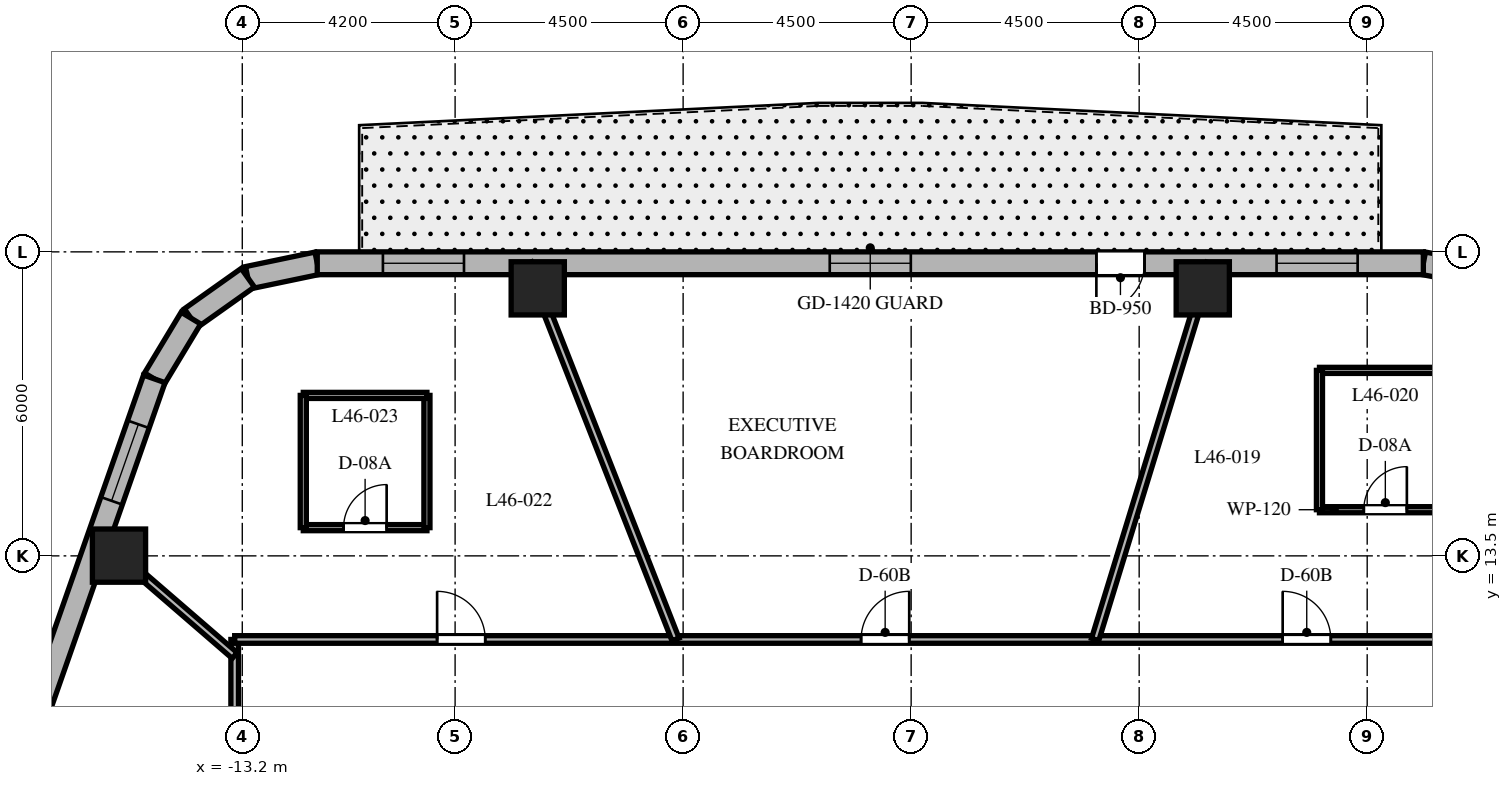
"""IFC4 building model, lengths in metres.
Left out: names, types, materials, properties, quantities, classifications, styles, units other than length and angle.
Written with IfcOpenShell. Run it as: python <this file> out.ifc"""

import sys

from ifc_helpers import new_model, si_unit, direction, frame, frame_2d, origin, origin_2d, place, context, subcontext, project, spatial, rectangle, extrude, element, fill, save


model = new_model("IFC4")
c1 = context("Model", 3, precision=1e-05, world=origin(), true_north=direction((0.0, 1.0)))
c2 = subcontext(c1, "Body", "Model", "MODEL_VIEW")
j1 = project(units=[si_unit("LENGTHUNIT", "METRE"), si_unit("PLANEANGLEUNIT", "RADIAN")], contexts=[c1])
p1 = place(None, origin())
s1 = spatial("IfcSite", under=j1, at=p1, CompositionType="ELEMENT")
p2 = place(p1, origin())
s2 = spatial("IfcBuilding", under=s1, at=p2, CompositionType="ELEMENT")
p3 = place(p2, frame((0.0, 0.0, 186.7)))
s3 = spatial("IfcBuildingStorey", under=s2, at=p3, CompositionType="ELEMENT", Elevation=186.7)
for number, where, z_axis, x_axis in (
    (1, (5.755, 18.78, 0.0), (0.0, 0.0, 1.0), (1.0, 0.0, 0.0)),
    (2, (-7.369, 18.78, 0.0), (0.0, 0.0, 1.0), (1.0, 0.0, 0.0)),
    (3, (-15.633, 13.505, 0.0), (0.0, 0.0, 1.0), (1.0, 0.0, 0.0)),
):
    element("IfcColumn", number, at=place(p3, frame(where, z_axis=z_axis, x_axis=x_axis)), inside=s3, PredefinedType="COLUMN", context=c2, shape_type="SweptSolid", body=[
        extrude(rectangle(XDim=1.05, YDim=1.05, at=origin_2d()), origin(), (0.0, 0.0, 1.0), 3.7),
    ])
p4 = place(p3, frame((11.349, 19.043, 0.0), z_axis=(0.0, 0.0, 1.0), x_axis=(-0.982931267051, 0.183973161772, 0.0)))
e4 = element("IfcWall", 4, at=p4, inside=s3, PredefinedType="SOLIDWALL", context=c2, shape_type="SweptSolid", body=[
    extrude(rectangle(XDim=1.262, YDim=0.45, at=frame_2d((0.631, 0.0))), origin(), (0.0, 0.0, 1.0), 3.4),
])
p5 = place(p3, frame((-11.72, 19.275, 0.0), z_axis=(0.0, 0.0, 1.0), x_axis=(-0.97893106758, -0.204191001093, 0.0)))
e5 = element("IfcWall", 5, at=p5, inside=s3, PredefinedType="SOLIDWALL", context=c2, shape_type="SweptSolid", body=[
    extrude(rectangle(XDim=1.4, YDim=0.45, at=frame_2d((0.7, 0.0))), origin(), (0.0, 0.0, 1.0), 3.4),
])
p6 = place(p3, frame((-13.091, 18.989, 0.0), z_axis=(0.0, 0.0, 1.0), x_axis=(-0.815574637848, -0.578651890258, 0.0)))
e6 = element("IfcWall", 6, at=p6, inside=s3, PredefinedType="SOLIDWALL", context=c2, shape_type="SweptSolid", body=[
    extrude(rectangle(XDim=1.377, YDim=0.45, at=frame_2d((0.688, 0.0))), origin(), (0.0, 0.0, 1.0), 3.4),
])
p7 = place(p3, frame((-14.214, 18.192, 0.0), z_axis=(0.0, 0.0, 1.0), x_axis=(-0.516340945502, -0.856383108193, 0.0)))
e7 = element("IfcWall", 7, at=p7, inside=s3, PredefinedType="SOLIDWALL", context=c2, shape_type="SweptSolid", body=[
    extrude(rectangle(XDim=1.4, YDim=0.45, at=frame_2d((0.7, 0.0))), origin(), (0.0, 0.0, 1.0), 3.4),
])
p8 = place(p3, frame((10.108, 19.275, 0.0), z_axis=(0.0, 0.0, 1.0), x_axis=(-1.0, 0.0, 0.0)))
e8 = element("IfcWall", 8, at=p8, inside=s3, PredefinedType="SOLIDWALL", context=c2, shape_type="SweptSolid", body=[
    extrude(rectangle(XDim=21.829, YDim=0.45, at=frame_2d((10.915, 0.0))), origin(), (0.0, 0.0, 1.0), 3.4),
])
p9 = place(p8, frame((5.503, 0.0, 0.0)))
e9 = element("IfcOpeningElement", 9, at=p9, cuts=e8, PredefinedType="OPENING", context=c2, shape_type="SweptSolid", body=[
    extrude(rectangle(XDim=0.95, YDim=2.15, at=frame_2d((0.475, 1.075))), frame((0.0, 0.235, 0.0), z_axis=(0.0, -1.0, 0.0), x_axis=(1.0, 0.0, 0.0)), (0.0, 0.0, 1.0), 0.47),
])
p10 = place(p8, frame((1.297, 0.0, 0.8)))
e10 = element("IfcOpeningElement", 10, at=p10, cuts=e8, PredefinedType="OPENING", context=c2, shape_type="SweptSolid", body=[
    extrude(rectangle(XDim=1.6, YDim=1.75, at=frame_2d((0.8, 0.875))), frame((0.0, 0.235, 0.0), z_axis=(0.0, -1.0, 0.0), x_axis=(1.0, 0.0, 0.0)), (0.0, 0.0, 1.0), 0.47),
])
p11 = place(p8, frame((10.115, 0.0, 0.8)))
e11 = element("IfcOpeningElement", 11, at=p11, cuts=e8, PredefinedType="OPENING", context=c2, shape_type="SweptSolid", body=[
    extrude(rectangle(XDim=1.6, YDim=1.75, at=frame_2d((0.8, 0.875))), frame((0.0, 0.235, 0.0), z_axis=(0.0, -1.0, 0.0), x_axis=(1.0, 0.0, 0.0)), (0.0, 0.0, 1.0), 0.47),
])
p12 = place(p8, frame((18.933, 0.0, 0.8)))
e12 = element("IfcOpeningElement", 12, at=p12, cuts=e8, PredefinedType="OPENING", context=c2, shape_type="SweptSolid", body=[
    extrude(rectangle(XDim=1.6, YDim=1.75, at=frame_2d((0.8, 0.875))), frame((0.0, 0.235, 0.0), z_axis=(0.0, -1.0, 0.0), x_axis=(1.0, 0.0, 0.0)), (0.0, 0.0, 1.0), 0.47),
])
p13 = place(p3, frame((-14.937, 16.993, 0.0), z_axis=(0.0, 0.0, 1.0), x_axis=(-0.330431575061, -0.943829949834, 0.0)))
e13 = element("IfcWall", 13, at=p13, inside=s3, PredefinedType="SOLIDWALL", context=c2, shape_type="SweptSolid", body=[
    extrude(rectangle(XDim=17.689, YDim=0.45, at=frame_2d((8.844, 0.0))), origin(), (0.0, 0.0, 1.0), 3.4),
])
p14 = place(p13, frame((0.95, 0.0, 0.8)))
e14 = element("IfcOpeningElement", 14, at=p14, cuts=e13, PredefinedType="OPENING", context=c2, shape_type="SweptSolid", body=[
    extrude(rectangle(XDim=1.6, YDim=1.75, at=frame_2d((0.8, 0.875))), frame((0.0, 0.235, 0.0), z_axis=(0.0, -1.0, 0.0), x_axis=(1.0, 0.0, 0.0)), (0.0, 0.0, 1.0), 0.47),
])
p15 = place(p13, frame((7.99, 0.0, 0.8)))
e15 = element("IfcOpeningElement", 15, at=p15, cuts=e13, PredefinedType="OPENING", context=c2, shape_type="SweptSolid", body=[
    extrude(rectangle(XDim=1.6, YDim=1.75, at=frame_2d((0.8, 0.875))), frame((0.0, 0.235, 0.0), z_axis=(0.0, -1.0, 0.0), x_axis=(1.0, 0.0, 0.0)), (0.0, 0.0, 1.0), 0.47),
])
p16 = place(p13, frame((15.084, 0.0, 0.8)))
e16 = element("IfcOpeningElement", 16, at=p16, cuts=e13, PredefinedType="OPENING", context=c2, shape_type="SweptSolid", body=[
    extrude(rectangle(XDim=1.6, YDim=1.75, at=frame_2d((0.8, 0.875))), frame((0.0, 0.235, 0.0), z_axis=(0.0, -1.0, 0.0), x_axis=(1.0, 0.0, 0.0)), (0.0, 0.0, 1.0), 0.47),
])
p17 = place(p3, frame((-13.35, -11.85, 0.0), z_axis=(0.0, 0.0, 1.0), x_axis=(0.0, 1.0, 0.0)))
e17 = element("IfcWall", 17, at=p17, inside=s3, PredefinedType="PARTITIONING", context=c2, shape_type="SweptSolid", body=[
    extrude(rectangle(XDim=23.7, YDim=0.15, at=frame_2d((11.85, 0.0))), origin(), (0.0, 0.0, 1.0), 2.84),
])
p18 = place(p17, frame((18.389, 0.0, 0.0)))
e18 = element("IfcOpeningElement", 18, at=p18, cuts=e17, PredefinedType="OPENING", context=c2, shape_type="SweptSolid", body=[
    extrude(rectangle(XDim=0.95, YDim=2.03, at=frame_2d((0.475, 1.015))), frame((0.0, 0.085, 0.0), z_axis=(0.0, -1.0, 0.0), x_axis=(1.0, 0.0, 0.0)), (0.0, 0.0, 1.0), 0.17),
])
p19 = place(p17, frame((10.751, 0.0, 0.0)))
e19 = element("IfcOpeningElement", 19, at=p19, cuts=e17, PredefinedType="OPENING", context=c2, shape_type="SweptSolid", body=[
    extrude(rectangle(XDim=0.95, YDim=2.03, at=frame_2d((0.475, 1.015))), frame((0.0, 0.085, 0.0), z_axis=(0.0, -1.0, 0.0), x_axis=(1.0, 0.0, 0.0)), (0.0, 0.0, 1.0), 0.17),
])
p20 = place(p17, frame((3.74, 0.0, 0.0)))
e20 = element("IfcOpeningElement", 20, at=p20, cuts=e17, PredefinedType="OPENING", context=c2, shape_type="SweptSolid", body=[
    extrude(rectangle(XDim=0.95, YDim=2.03, at=frame_2d((0.475, 1.015))), frame((0.0, 0.085, 0.0), z_axis=(0.0, -1.0, 0.0), x_axis=(1.0, 0.0, 0.0)), (0.0, 0.0, 1.0), 0.17),
])
p21 = place(p3, frame((-13.35, 11.85, 0.0), z_axis=(0.0, 0.0, 1.0), x_axis=(1.0, 0.0, 0.0)))
e21 = element("IfcWall", 21, at=p21, inside=s3, PredefinedType="PARTITIONING", context=c2, shape_type="SweptSolid", body=[
    extrude(rectangle(XDim=26.7, YDim=0.15, at=frame_2d((13.35, 0.0))), origin(), (0.0, 0.0, 1.0), 2.84),
])
p22 = place(p21, frame((20.682, 0.0, 0.0)))
e22 = element("IfcOpeningElement", 22, at=p22, cuts=e21, PredefinedType="OPENING", context=c2, shape_type="SweptSolid", body=[
    extrude(rectangle(XDim=0.95, YDim=2.03, at=frame_2d((0.475, 1.015))), frame((0.0, 0.085, 0.0), z_axis=(0.0, -1.0, 0.0), x_axis=(1.0, 0.0, 0.0)), (0.0, 0.0, 1.0), 0.17),
])
p23 = place(p21, frame((12.362, 0.0, 0.0)))
e23 = element("IfcOpeningElement", 23, at=p23, cuts=e21, PredefinedType="OPENING", context=c2, shape_type="SweptSolid", body=[
    extrude(rectangle(XDim=0.95, YDim=2.03, at=frame_2d((0.475, 1.015))), frame((0.0, 0.085, 0.0), z_axis=(0.0, -1.0, 0.0), x_axis=(1.0, 0.0, 0.0)), (0.0, 0.0, 1.0), 0.17),
])
p24 = place(p21, frame((3.995, 0.0, 0.0)))
e24 = element("IfcOpeningElement", 24, at=p24, cuts=e21, PredefinedType="OPENING", context=c2, shape_type="SweptSolid", body=[
    extrude(rectangle(XDim=0.95, YDim=2.03, at=frame_2d((0.475, 1.015))), frame((0.0, 0.085, 0.0), z_axis=(0.0, -1.0, 0.0), x_axis=(1.0, 0.0, 0.0)), (0.0, 0.0, 1.0), 0.17),
])
p25 = place(p3, frame((3.631, 11.85, 0.0), z_axis=(0.0, 0.0, 1.0), x_axis=(0.293007573338, 0.956110120209, 0.0)))
e25 = element("IfcWall", 25, at=p25, inside=s3, PredefinedType="PARTITIONING", context=c2, shape_type="SweptSolid", body=[
    extrude(rectangle(XDim=7.766, YDim=0.15, at=frame_2d((3.883, 0.0))), origin(), (0.0, 0.0, 1.0), 2.64),
])
p26 = place(p3, frame((-4.65, 11.85, 0.0), z_axis=(0.0, 0.0, 1.0), x_axis=(-0.365265947993, 0.930903210456, 0.0)))
e26 = element("IfcWall", 26, at=p26, inside=s3, PredefinedType="PARTITIONING", context=c2, shape_type="SweptSolid", body=[
    extrude(rectangle(XDim=7.976, YDim=0.15, at=frame_2d((3.988, 0.0))), origin(), (0.0, 0.0, 1.0), 2.64),
])
p27 = place(p3, frame((-13.35, 11.533, 0.0), z_axis=(0.0, 0.0, 1.0), x_axis=(-0.756711647314, 0.65374879183, 0.0)))
e27 = element("IfcWall", 27, at=p27, inside=s3, PredefinedType="PARTITIONING", context=c2, shape_type="SweptSolid", body=[
    extrude(rectangle(XDim=3.55, YDim=0.15, at=frame_2d((1.775, 0.0))), origin(), (0.0, 0.0, 1.0), 2.64),
])
p28 = place(p3, frame((8.058, 14.411, 0.0), z_axis=(0.0, 0.0, 1.0), x_axis=(1.0, 0.0, 0.0)))
e28 = element("IfcWall", 28, at=p28, inside=s3, PredefinedType="PARTITIONING", context=c2, shape_type="SweptSolid", body=[
    extrude(rectangle(XDim=2.6, YDim=0.12, at=frame_2d((1.3, 0.0))), origin(), (0.0, 0.0, 1.0), 3.4),
])
p29 = place(p28, frame((0.875, 0.0, 0.0)))
e29 = element("IfcOpeningElement", 29, at=p29, cuts=e28, PredefinedType="OPENING", context=c2, shape_type="SweptSolid", body=[
    extrude(rectangle(XDim=0.85, YDim=2.03, at=frame_2d((0.425, 1.015))), frame((0.0, 0.07, 0.0), z_axis=(0.0, -1.0, 0.0), x_axis=(1.0, 0.0, 0.0)), (0.0, 0.0, 1.0), 0.14),
])
p30 = place(p3, frame((10.658, 17.161, 0.0), z_axis=(0.0, 0.0, 1.0), x_axis=(-1.0, 0.0, 0.0)))
e30 = element("IfcWall", 30, at=p30, inside=s3, PredefinedType="PARTITIONING", context=c2, shape_type="SweptSolid", body=[
    extrude(rectangle(XDim=2.6, YDim=0.12, at=frame_2d((1.3, 0.0))), origin(), (0.0, 0.0, 1.0), 2.64),
])
p31 = place(p3, frame((8.058, 17.161, 0.0), z_axis=(0.0, 0.0, 1.0), x_axis=(0.0, -1.0, 0.0)))
e31 = element("IfcWall", 31, at=p31, inside=s3, PredefinedType="PARTITIONING", context=c2, shape_type="SweptSolid", body=[
    extrude(rectangle(XDim=2.75, YDim=0.12, at=frame_2d((1.375, 0.0))), origin(), (0.0, 0.0, 1.0), 3.4),
])
p32 = place(p3, frame((-11.996, 14.057, 0.0), z_axis=(0.0, 0.0, 1.0), x_axis=(1.0, 0.0, 0.0)))
e32 = element("IfcWall", 32, at=p32, inside=s3, PredefinedType="PARTITIONING", context=c2, shape_type="SweptSolid", body=[
    extrude(rectangle(XDim=2.44, YDim=0.12, at=frame_2d((1.22, 0.0))), origin(), (0.0, 0.0, 1.0), 2.927),
])
p33 = place(p32, frame((0.795, 0.0, 0.0)))
e33 = element("IfcOpeningElement", 33, at=p33, cuts=e32, PredefinedType="OPENING", context=c2, shape_type="SweptSolid", body=[
    extrude(rectangle(XDim=0.85, YDim=2.03, at=frame_2d((0.425, 1.015))), frame((0.0, 0.07, 0.0), z_axis=(0.0, -1.0, 0.0), x_axis=(1.0, 0.0, 0.0)), (0.0, 0.0, 1.0), 0.14),
])
p34 = place(p3, frame((-9.556, 14.057, 0.0), z_axis=(0.0, 0.0, 1.0), x_axis=(0.0, 1.0, 0.0)))
e34 = element("IfcWall", 34, at=p34, inside=s3, PredefinedType="PARTITIONING", context=c2, shape_type="SweptSolid", body=[
    extrude(rectangle(XDim=2.61, YDim=0.12, at=frame_2d((1.305, 0.0))), origin(), (0.0, 0.0, 1.0), 2.927),
])
p35 = place(p3, frame((-9.556, 16.667, 0.0), z_axis=(0.0, 0.0, 1.0), x_axis=(-1.0, 0.0, 0.0)))
e35 = element("IfcWall", 35, at=p35, inside=s3, PredefinedType="PARTITIONING", context=c2, shape_type="SweptSolid", body=[
    extrude(rectangle(XDim=2.44, YDim=0.12, at=frame_2d((1.22, 0.0))), origin(), (0.0, 0.0, 1.0), 2.64),
])
p36 = place(p3, frame((-11.996, 16.667, 0.0), z_axis=(0.0, 0.0, 1.0), x_axis=(0.0, -1.0, 0.0)))
e36 = element("IfcWall", 36, at=p36, inside=s3, PredefinedType="PARTITIONING", context=c2, shape_type="SweptSolid", body=[
    extrude(rectangle(XDim=2.61, YDim=0.12, at=frame_2d((1.305, 0.0))), origin(), (0.0, 0.0, 1.0), 2.64),
])
p37 = place(p9, origin())
e37 = element("IfcDoor", 37, at=p37, inside=s3, OperationType="SINGLE_SWING_RIGHT", PredefinedType="DOOR", context=c2, shape_type="SweptSolid", body=[
    extrude(rectangle(XDim=0.95, YDim=2.15, at=frame_2d((0.475, 1.075))), frame((0.0, 0.025, 0.0), z_axis=(0.0, -1.0, 0.0), x_axis=(1.0, 0.0, 0.0)), (0.0, 0.0, 1.0), 0.05),
])
fill(e9, e37)
p38 = place(p10, origin())
e38 = element("IfcWindow", 38, at=p38, inside=s3, PartitioningType="SINGLE_PANEL", PredefinedType="WINDOW", context=c2, shape_type="SweptSolid", body=[
    extrude(rectangle(XDim=1.6, YDim=1.75, at=frame_2d((0.8, 0.875))), frame((0.0, 0.03, 0.0), z_axis=(0.0, -1.0, 0.0), x_axis=(1.0, 0.0, 0.0)), (0.0, 0.0, 1.0), 0.06),
])
fill(e10, e38)
p39 = place(p11, origin())
e39 = element("IfcWindow", 39, at=p39, inside=s3, PartitioningType="SINGLE_PANEL", PredefinedType="WINDOW", context=c2, shape_type="SweptSolid", body=[
    extrude(rectangle(XDim=1.6, YDim=1.75, at=frame_2d((0.8, 0.875))), frame((0.0, 0.03, 0.0), z_axis=(0.0, -1.0, 0.0), x_axis=(1.0, 0.0, 0.0)), (0.0, 0.0, 1.0), 0.06),
])
fill(e11, e39)
p40 = place(p12, origin())
e40 = element("IfcWindow", 40, at=p40, inside=s3, PartitioningType="SINGLE_PANEL", PredefinedType="WINDOW", context=c2, shape_type="SweptSolid", body=[
    extrude(rectangle(XDim=1.6, YDim=1.75, at=frame_2d((0.8, 0.875))), frame((0.0, 0.03, 0.0), z_axis=(0.0, -1.0, 0.0), x_axis=(1.0, 0.0, 0.0)), (0.0, 0.0, 1.0), 0.06),
])
fill(e12, e40)
p41 = place(p14, origin())
e41 = element("IfcWindow", 41, at=p41, inside=s3, PartitioningType="SINGLE_PANEL", PredefinedType="WINDOW", context=c2, shape_type="SweptSolid", body=[
    extrude(rectangle(XDim=1.6, YDim=1.75, at=frame_2d((0.8, 0.875))), frame((0.0, 0.03, 0.0), z_axis=(0.0, -1.0, 0.0), x_axis=(1.0, 0.0, 0.0)), (0.0, 0.0, 1.0), 0.06),
])
fill(e14, e41)
p42 = place(p22, origin())
e42 = element("IfcDoor", 42, at=p42, inside=s3, OperationType="SINGLE_SWING_LEFT", PredefinedType="DOOR", context=c2, shape_type="SweptSolid", body=[
    extrude(rectangle(XDim=0.95, YDim=2.03, at=frame_2d((0.475, 1.015))), frame((0.0, 0.025, 0.0), z_axis=(0.0, -1.0, 0.0), x_axis=(1.0, 0.0, 0.0)), (0.0, 0.0, 1.0), 0.05),
])
fill(e22, e42)
p43 = place(p29, origin())
e43 = element("IfcDoor", 43, at=p43, inside=s3, OperationType="SINGLE_SWING_RIGHT", PredefinedType="DOOR", context=c2, shape_type="SweptSolid", body=[
    extrude(rectangle(XDim=0.85, YDim=2.03, at=frame_2d((0.425, 1.015))), frame((0.0, 0.025, 0.0), z_axis=(0.0, -1.0, 0.0), x_axis=(1.0, 0.0, 0.0)), (0.0, 0.0, 1.0), 0.05),
])
fill(e29, e43)
p44 = place(p23, origin())
e44 = element("IfcDoor", 44, at=p44, inside=s3, OperationType="SINGLE_SWING_RIGHT", PredefinedType="DOOR", context=c2, shape_type="SweptSolid", body=[
    extrude(rectangle(XDim=0.95, YDim=2.03, at=frame_2d((0.475, 1.015))), frame((0.0, 0.025, 0.0), z_axis=(0.0, -1.0, 0.0), x_axis=(1.0, 0.0, 0.0)), (0.0, 0.0, 1.0), 0.05),
])
fill(e23, e44)
p45 = place(p24, origin())
e45 = element("IfcDoor", 45, at=p45, inside=s3, OperationType="SINGLE_SWING_LEFT", PredefinedType="DOOR", context=c2, shape_type="SweptSolid", body=[
    extrude(rectangle(XDim=0.95, YDim=2.03, at=frame_2d((0.475, 1.015))), frame((0.0, 0.025, 0.0), z_axis=(0.0, -1.0, 0.0), x_axis=(1.0, 0.0, 0.0)), (0.0, 0.0, 1.0), 0.05),
])
fill(e24, e45)
p46 = place(p33, origin())
e46 = element("IfcDoor", 46, at=p46, inside=s3, OperationType="SINGLE_SWING_RIGHT", PredefinedType="DOOR", context=c2, shape_type="SweptSolid", body=[
    extrude(rectangle(XDim=0.85, YDim=2.03, at=frame_2d((0.425, 1.015))), frame((0.0, 0.025, 0.0), z_axis=(0.0, -1.0, 0.0), x_axis=(1.0, 0.0, 0.0)), (0.0, 0.0, 1.0), 0.05),
])
fill(e33, e46)
save(model, sys.argv[1])
